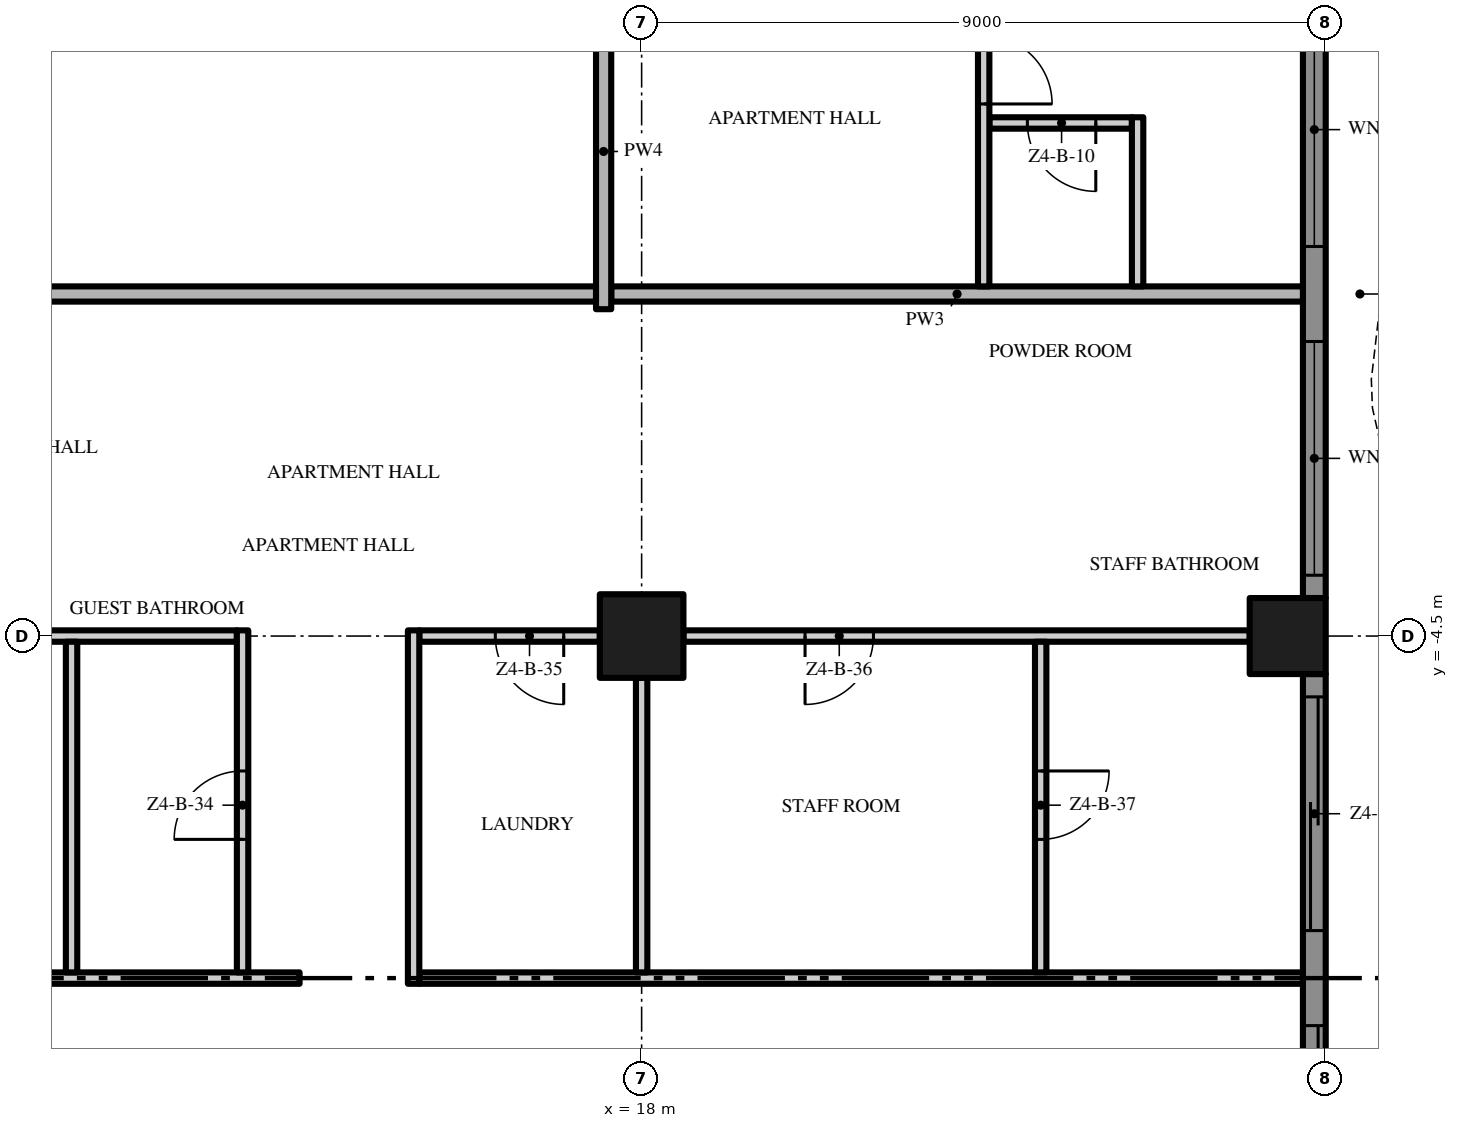
"""IFC4 building model, lengths in metres.
Left out: names, types, materials, properties, quantities, classifications, styles, units other than length and angle.
Written with IfcOpenShell. Run it as: python <this file> out.ifc"""

import sys

from ifc_helpers import new_model, si_unit, direction, frame, frame_2d, origin, origin_2d, place, context, subcontext, project, spatial, polyline, rectangle, outline, extrude, element, fill, save


model = new_model("IFC4")
c1 = context("Model", 3, precision=1e-05, world=origin(), true_north=direction((0.0, 1.0)))
c2 = subcontext(c1, "Body", "Model", "MODEL_VIEW")
j1 = project(units=[si_unit("LENGTHUNIT", "METRE"), si_unit("PLANEANGLEUNIT", "RADIAN")], contexts=[c1])
p1 = place(None, origin())
s1 = spatial("IfcSite", under=j1, at=p1, CompositionType="ELEMENT")
p2 = place(p1, origin())
s2 = spatial("IfcBuilding", under=s1, at=p2, CompositionType="ELEMENT")
p3 = place(p2, frame((0.0, 0.0, 199.6)))
s3 = spatial("IfcBuildingStorey", under=s2, at=p3, CompositionType="ELEMENT", Elevation=199.6)
p4 = place(p3, frame((18.0, -4.5, 0.0), z_axis=(0.0, 0.0, 1.0), x_axis=(1.0, 0.0, 0.0)))
e1 = element("IfcColumn", 1, at=p4, inside=s3, PredefinedType="COLUMN", context=c2, shape_type="SweptSolid", body=[
    extrude(rectangle(XDim=1.1, YDim=1.1, at=origin_2d()), origin(), (0.0, 0.0, 1.0), 3.5),
])
p5 = place(p3, frame((26.5, -4.5, 0.0), z_axis=(0.0, 0.0, 1.0), x_axis=(1.0, 0.0, 0.0)))
e2 = element("IfcColumn", 2, at=p5, inside=s3, PredefinedType="COLUMN", context=c2, shape_type="SweptSolid", body=[
    extrude(rectangle(XDim=1.0, YDim=1.0, at=origin_2d()), origin(), (0.0, 0.0, 1.0), 3.5),
])
p6 = place(p3, frame((26.85, -5.0, 0.0), z_axis=(0.0, 0.0, 1.0), x_axis=(0.0, -1.0, 0.0)))
e3 = element("IfcWall", 3, at=p6, inside=s3, PredefinedType="SOLIDWALL", context=c2, shape_type="SweptSolid", body=[
    extrude(rectangle(XDim=8.0, YDim=0.3, at=frame_2d((4.0, 0.0))), origin(), (0.0, 0.0, 1.0), 3.5),
])
p7 = place(p6, frame((4.625, 0.0, 0.0)))
e4 = element("IfcOpeningElement", 4, at=p7, cuts=e3, PredefinedType="OPENING", context=c2, shape_type="SweptSolid", body=[
    extrude(rectangle(XDim=3.075, YDim=2.4, at=frame_2d((1.538, 1.2))), frame((0.0, 0.16, 0.0), z_axis=(0.0, -1.0, 0.0), x_axis=(1.0, 0.0, 0.0)), (0.0, 0.0, 1.0), 0.32),
])
p8 = place(p6, frame((0.3, 0.0, 0.0)))
e5 = element("IfcOpeningElement", 5, at=p8, cuts=e3, PredefinedType="OPENING", context=c2, shape_type="SweptSolid", body=[
    extrude(rectangle(XDim=3.075, YDim=2.4, at=frame_2d((1.538, 1.2))), frame((0.0, 0.16, 0.0), z_axis=(0.0, -1.0, 0.0), x_axis=(1.0, 0.0, 0.0)), (0.0, 0.0, 1.0), 0.32),
])
p9 = place(p3, frame((26.85, 4.0, 0.0), z_axis=(0.0, 0.0, 1.0), x_axis=(0.0, -1.0, 0.0)))
e6 = element("IfcWall", 6, at=p9, inside=s3, PredefinedType="SOLIDWALL", context=c2, shape_type="SweptSolid", body=[
    extrude(rectangle(XDim=8.0, YDim=0.3, at=frame_2d((4.0, 0.0))), origin(), (0.0, 0.0, 1.0), 3.5),
])
p10 = place(p9, frame((4.625, 0.0, 0.45)))
e7 = element("IfcOpeningElement", 7, at=p10, cuts=e6, PredefinedType="OPENING", context=c2, shape_type="SweptSolid", body=[
    extrude(rectangle(XDim=3.075, YDim=2.65, at=frame_2d((1.538, 1.325))), frame((0.0, 0.16, 0.0), z_axis=(0.0, -1.0, 0.0), x_axis=(1.0, 0.0, 0.0)), (0.0, 0.0, 1.0), 0.32),
])
p11 = place(p9, frame((0.3, 0.0, 0.45)))
e8 = element("IfcOpeningElement", 8, at=p11, cuts=e6, PredefinedType="OPENING", context=c2, shape_type="SweptSolid", body=[
    extrude(rectangle(XDim=3.075, YDim=2.65, at=frame_2d((1.538, 1.325))), frame((0.0, 0.16, 0.0), z_axis=(0.0, -1.0, 0.0), x_axis=(1.0, 0.0, 0.0)), (0.0, 0.0, 1.0), 0.32),
])
p12 = place(p3, origin())
e9 = element("IfcWall", 9, at=p12, inside=s3, PredefinedType="USERDEFINED", context=c2, shape_type="SweptSolid", body=[
    extrude(outline(polyline([(27.951, -18.0), (27.615, -16.5), (27.6, -16.125), (27.731, -15.0), (28.255, -13.5), (28.988, -12.0), (29.649, -10.5), (29.985, -9.0), (30.0, -8.625), (29.869, -7.5), (29.345, -6.0), (28.612, -4.5), (27.951, -3.0), (27.615, -1.5), (27.6, -1.125), (27.731, 0.0), (28.255, 1.5), (28.988, 3.0), (29.649, 4.5), (29.985, 6.0), (30.0, 6.375), (29.869, 7.5), (29.345, 9.0), (28.612, 10.5), (27.951, 12.0), (27.615, 13.5), (27.6, 13.875), (27.731, 15.0), (28.255, 16.5), (28.988, 18.0), (28.763, 18.11), (28.024, 16.596), (27.486, 15.056), (27.349, 13.885), (27.366, 13.467), (27.713, 11.921), (28.385, 10.395), (29.114, 8.904), (29.624, 7.444), (29.749, 6.365), (29.736, 6.033), (29.41, 4.579), (28.761, 3.105), (28.024, 1.596), (27.486, 0.056), (27.349, -1.115), (27.366, -1.533), (27.713, -3.079), (28.385, -4.605), (29.114, -6.096), (29.624, -7.556), (29.749, -8.635), (29.736, -8.967), (29.41, -10.421), (28.761, -11.895), (28.024, -13.404), (27.486, -14.944), (27.349, -16.115), (27.366, -16.533), (27.708, -18.055), (27.951, -18.0)])), origin(), (0.0, 0.0, 1.0), 0.9),
])
p13 = place(p3, frame((0.1, -9.0, 0.0), z_axis=(0.0, 0.0, 1.0), x_axis=(1.0, 0.0, 0.0)))
e10 = element("IfcWall", 10, at=p13, inside=s3, PredefinedType="PARTITIONING", context=c2, shape_type="SweptSolid", body=[
    extrude(rectangle(XDim=13.4, YDim=0.15, at=frame_2d((6.7, 0.0))), origin(), (0.0, 0.0, 1.0), 3.5),
])
p14 = place(p13, frame((6.9, 0.0, 0.0)))
e11 = element("IfcOpeningElement", 11, at=p14, cuts=e10, PredefinedType="OPENING", context=c2, shape_type="SweptSolid", body=[
    extrude(rectangle(XDim=1.0, YDim=2.4, at=frame_2d((0.5, 1.2))), frame((0.0, 0.085, 0.0), z_axis=(0.0, -1.0, 0.0), x_axis=(1.0, 0.0, 0.0)), (0.0, 0.0, 1.0), 0.17),
])
p15 = place(p3, frame((15.075, -9.0, 0.0), z_axis=(0.0, 0.0, 1.0), x_axis=(1.0, 0.0, 0.0)))
e12 = element("IfcWall", 12, at=p15, inside=s3, PredefinedType="PARTITIONING", context=c2, shape_type="SweptSolid", body=[
    extrude(rectangle(XDim=11.625, YDim=0.15, at=frame_2d((5.812, 0.0))), origin(), (0.0, 0.0, 1.0), 3.5),
])
p16 = place(p3, frame((9.55, -4.5, 0.0), z_axis=(0.0, 0.0, 1.0), x_axis=(1.0, 0.0, 0.0)))
e13 = element("IfcWall", 13, at=p16, inside=s3, PredefinedType="PARTITIONING", context=c2, shape_type="SweptSolid", body=[
    extrude(rectangle(XDim=3.125, YDim=0.15, at=frame_2d((1.562, 0.0))), origin(), (0.0, 0.0, 1.0), 3.5),
])
p17 = place(p3, frame((17.45, -4.5, 0.0), z_axis=(0.0, 0.0, 1.0), x_axis=(-1.0, 0.0, 0.0)))
e14 = element("IfcWall", 14, at=p17, inside=s3, PredefinedType="PARTITIONING", context=c2, shape_type="SweptSolid", body=[
    extrude(rectangle(XDim=2.375, YDim=0.15, at=frame_2d((1.188, 0.0))), origin(), (0.0, 0.0, 1.0), 3.5),
])
p18 = place(p17, frame((0.475, 0.0, 0.0)))
e15 = element("IfcOpeningElement", 15, at=p18, cuts=e14, PredefinedType="OPENING", context=c2, shape_type="SweptSolid", body=[
    extrude(rectangle(XDim=0.9, YDim=2.1, at=frame_2d((0.45, 1.05))), frame((0.0, 0.085, 0.0), z_axis=(0.0, -1.0, 0.0), x_axis=(1.0, 0.0, 0.0)), (0.0, 0.0, 1.0), 0.17),
])
p19 = place(p3, frame((26.0, -4.5, 0.0), z_axis=(0.0, 0.0, 1.0), x_axis=(-1.0, 0.0, 0.0)))
e16 = element("IfcWall", 16, at=p19, inside=s3, PredefinedType="PARTITIONING", context=c2, shape_type="SweptSolid", body=[
    extrude(rectangle(XDim=7.45, YDim=0.15, at=frame_2d((3.725, 0.0))), origin(), (0.0, 0.0, 1.0), 3.5),
])
p20 = place(p19, frame((4.95, 0.0, 0.0)))
e17 = element("IfcOpeningElement", 17, at=p20, cuts=e16, PredefinedType="OPENING", context=c2, shape_type="SweptSolid", body=[
    extrude(rectangle(XDim=0.9, YDim=2.1, at=frame_2d((0.45, 1.05))), frame((0.0, 0.085, 0.0), z_axis=(0.0, -1.0, 0.0), x_axis=(1.0, 0.0, 0.0)), (0.0, 0.0, 1.0), 0.17),
])
p21 = place(p3, frame((17.4, 0.0, 0.0), z_axis=(0.0, 0.0, 1.0), x_axis=(-1.0, 0.0, 0.0)))
e18 = element("IfcWall", 18, at=p21, inside=s3, PredefinedType="PARTITIONING", context=c2, shape_type="SweptSolid", body=[
    extrude(rectangle(XDim=17.3, YDim=0.2, at=frame_2d((8.65, 0.0))), origin(), (0.0, 0.0, 1.0), 3.5),
])
p22 = place(p21, frame((7.65, 0.0, 0.0)))
e19 = element("IfcOpeningElement", 19, at=p22, cuts=e18, PredefinedType="OPENING", context=c2, shape_type="SweptSolid", body=[
    extrude(rectangle(XDim=1.5, YDim=2.4, at=frame_2d((0.75, 1.2))), frame((0.0, 0.11, 0.0), z_axis=(0.0, -1.0, 0.0), x_axis=(1.0, 0.0, 0.0)), (0.0, 0.0, 1.0), 0.22),
])
p23 = place(p3, frame((17.6, 0.0, 0.0), z_axis=(0.0, 0.0, 1.0), x_axis=(1.0, 0.0, 0.0)))
e20 = element("IfcWall", 20, at=p23, inside=s3, PredefinedType="PARTITIONING", context=c2, shape_type="SweptSolid", body=[
    extrude(rectangle(XDim=9.1, YDim=0.2, at=frame_2d((4.55, 0.0))), origin(), (0.0, 0.0, 1.0), 3.5),
])
p24 = place(p3, frame((24.45, 2.25, 0.0), z_axis=(0.0, 0.0, 1.0), x_axis=(-1.0, 0.0, 0.0)))
e21 = element("IfcWall", 21, at=p24, inside=s3, PredefinedType="PARTITIONING", context=c2, shape_type="SweptSolid", body=[
    extrude(rectangle(XDim=1.875, YDim=0.15, at=frame_2d((0.938, 0.0))), origin(), (0.0, 0.0, 1.0), 3.5),
])
p25 = place(p24, frame((0.475, 0.0, 0.0)))
e22 = element("IfcOpeningElement", 22, at=p25, cuts=e21, PredefinedType="OPENING", context=c2, shape_type="SweptSolid", body=[
    extrude(rectangle(XDim=0.9, YDim=2.1, at=frame_2d((0.45, 1.05))), frame((0.0, 0.085, 0.0), z_axis=(0.0, -1.0, 0.0), x_axis=(1.0, 0.0, 0.0)), (0.0, 0.0, 1.0), 0.17),
])
p26 = place(p3, frame((10.5, -8.925, 0.0), z_axis=(0.0, 0.0, 1.0), x_axis=(0.0, 1.0, 0.0)))
e23 = element("IfcWall", 23, at=p26, inside=s3, PredefinedType="PARTITIONING", context=c2, shape_type="SweptSolid", body=[
    extrude(rectangle(XDim=4.35, YDim=0.15, at=frame_2d((2.175, 0.0))), origin(), (0.0, 0.0, 1.0), 3.5),
])
p27 = place(p3, frame((12.75, -8.925, 0.0), z_axis=(0.0, 0.0, 1.0), x_axis=(0.0, 1.0, 0.0)))
e24 = element("IfcWall", 24, at=p27, inside=s3, PredefinedType="PARTITIONING", context=c2, shape_type="SweptSolid", body=[
    extrude(rectangle(XDim=4.5, YDim=0.15, at=frame_2d((2.25, 0.0))), origin(), (0.0, 0.0, 1.0), 3.5),
])
p28 = place(p27, frame((1.75, 0.0, 0.0)))
e25 = element("IfcOpeningElement", 25, at=p28, cuts=e24, PredefinedType="OPENING", context=c2, shape_type="SweptSolid", body=[
    extrude(rectangle(XDim=0.9, YDim=2.1, at=frame_2d((0.45, 1.05))), frame((0.0, 0.085, 0.0), z_axis=(0.0, -1.0, 0.0), x_axis=(1.0, 0.0, 0.0)), (0.0, 0.0, 1.0), 0.17),
])
p29 = place(p3, frame((15.0, -9.075, 0.0), z_axis=(0.0, 0.0, 1.0), x_axis=(0.0, 1.0, 0.0)))
e26 = element("IfcWall", 26, at=p29, inside=s3, PredefinedType="PARTITIONING", context=c2, shape_type="SweptSolid", body=[
    extrude(rectangle(XDim=4.65, YDim=0.15, at=frame_2d((2.325, 0.0))), origin(), (0.0, 0.0, 1.0), 3.5),
])
p30 = place(p3, frame((17.5, -0.2, 0.0), z_axis=(0.0, 0.0, 1.0), x_axis=(0.0, 1.0, 0.0)))
e27 = element("IfcWall", 27, at=p30, inside=s3, PredefinedType="PARTITIONING", context=c2, shape_type="SweptSolid", body=[
    extrude(rectangle(XDim=4.15, YDim=0.2, at=frame_2d((2.075, 0.0))), origin(), (0.0, 0.0, 1.0), 3.5),
])
p31 = place(p3, frame((18.0, -8.925, 0.0), z_axis=(0.0, 0.0, 1.0), x_axis=(0.0, 1.0, 0.0)))
e28 = element("IfcWall", 28, at=p31, inside=s3, PredefinedType="PARTITIONING", context=c2, shape_type="SweptSolid", body=[
    extrude(rectangle(XDim=3.875, YDim=0.15, at=frame_2d((1.938, 0.0))), origin(), (0.0, 0.0, 1.0), 3.5),
])
p32 = place(p3, frame((22.5, 17.5, 0.0), z_axis=(0.0, 0.0, 1.0), x_axis=(0.0, -1.0, 0.0)))
e29 = element("IfcWall", 29, at=p32, inside=s3, PredefinedType="PARTITIONING", context=c2, shape_type="SweptSolid", body=[
    extrude(rectangle(XDim=17.4, YDim=0.15, at=frame_2d((8.7, 0.0))), origin(), (0.0, 0.0, 1.0), 3.5),
])
p33 = place(p32, frame((13.2, 0.0, 0.0)))
e30 = element("IfcOpeningElement", 30, at=p33, cuts=e29, PredefinedType="OPENING", context=c2, shape_type="SweptSolid", body=[
    extrude(rectangle(XDim=1.8, YDim=2.4, at=frame_2d((0.9, 1.2))), frame((0.0, 0.085, 0.0), z_axis=(0.0, -1.0, 0.0), x_axis=(1.0, 0.0, 0.0)), (0.0, 0.0, 1.0), 0.17),
])
p34 = place(p32, frame((5.75, 0.0, 0.0)))
e31 = element("IfcOpeningElement", 31, at=p34, cuts=e29, PredefinedType="OPENING", context=c2, shape_type="SweptSolid", body=[
    extrude(rectangle(XDim=1.0, YDim=2.4, at=frame_2d((0.5, 1.2))), frame((0.0, 0.085, 0.0), z_axis=(0.0, -1.0, 0.0), x_axis=(1.0, 0.0, 0.0)), (0.0, 0.0, 1.0), 0.17),
])
p35 = place(p3, frame((23.25, -4.575, 0.0), z_axis=(0.0, 0.0, 1.0), x_axis=(0.0, -1.0, 0.0)))
e32 = element("IfcWall", 32, at=p35, inside=s3, PredefinedType="PARTITIONING", context=c2, shape_type="SweptSolid", body=[
    extrude(rectangle(XDim=4.35, YDim=0.15, at=frame_2d((2.175, 0.0))), origin(), (0.0, 0.0, 1.0), 3.5),
])
p36 = place(p35, frame((1.7, 0.0, 0.0)))
e33 = element("IfcOpeningElement", 33, at=p36, cuts=e32, PredefinedType="OPENING", context=c2, shape_type="SweptSolid", body=[
    extrude(rectangle(XDim=0.9, YDim=2.1, at=frame_2d((0.45, 1.05))), frame((0.0, 0.085, 0.0), z_axis=(0.0, -1.0, 0.0), x_axis=(1.0, 0.0, 0.0)), (0.0, 0.0, 1.0), 0.17),
])
p37 = place(p3, frame((24.525, 0.1, 0.0), z_axis=(0.0, 0.0, 1.0), x_axis=(0.0, 1.0, 0.0)))
e34 = element("IfcWall", 34, at=p37, inside=s3, PredefinedType="PARTITIONING", context=c2, shape_type="SweptSolid", body=[
    extrude(rectangle(XDim=2.225, YDim=0.15, at=frame_2d((1.113, 0.0))), origin(), (0.0, 0.0, 1.0), 3.5),
])
p38 = place(p7, origin())
e35 = element("IfcDoor", 35, at=p38, inside=s3, OperationType="SINGLE_SWING_LEFT", PredefinedType="DOOR", context=c2, shape_type="SweptSolid", body=[
    extrude(rectangle(XDim=3.075, YDim=2.4, at=frame_2d((1.538, 1.2))), frame((0.0, 0.025, 0.0), z_axis=(0.0, -1.0, 0.0), x_axis=(1.0, 0.0, 0.0)), (0.0, 0.0, 1.0), 0.05),
])
fill(e4, e35)
p39 = place(p8, origin())
e36 = element("IfcDoor", 36, at=p39, inside=s3, OperationType="SINGLE_SWING_LEFT", PredefinedType="DOOR", context=c2, shape_type="SweptSolid", body=[
    extrude(rectangle(XDim=3.075, YDim=2.4, at=frame_2d((1.538, 1.2))), frame((0.0, 0.025, 0.0), z_axis=(0.0, -1.0, 0.0), x_axis=(1.0, 0.0, 0.0)), (0.0, 0.0, 1.0), 0.05),
])
fill(e5, e36)
p40 = place(p10, origin())
e37 = element("IfcWindow", 37, at=p40, inside=s3, PartitioningType="SINGLE_PANEL", PredefinedType="WINDOW", context=c2, shape_type="SweptSolid", body=[
    extrude(rectangle(XDim=3.075, YDim=2.65, at=frame_2d((1.538, 1.325))), frame((0.0, 0.03, 0.0), z_axis=(0.0, -1.0, 0.0), x_axis=(1.0, 0.0, 0.0)), (0.0, 0.0, 1.0), 0.06),
])
fill(e7, e37)
p41 = place(p11, origin())
e38 = element("IfcWindow", 38, at=p41, inside=s3, PartitioningType="SINGLE_PANEL", PredefinedType="WINDOW", context=c2, shape_type="SweptSolid", body=[
    extrude(rectangle(XDim=3.075, YDim=2.65, at=frame_2d((1.538, 1.325))), frame((0.0, 0.03, 0.0), z_axis=(0.0, -1.0, 0.0), x_axis=(1.0, 0.0, 0.0)), (0.0, 0.0, 1.0), 0.06),
])
fill(e8, e38)
p42 = place(p33, origin())
e39 = element("IfcDoor", 39, at=p42, inside=s3, OperationType="DOUBLE_DOOR_SINGLE_SWING", PredefinedType="DOOR", context=c2, shape_type="SweptSolid", body=[
    extrude(rectangle(XDim=1.8, YDim=2.4, at=frame_2d((0.9, 1.2))), frame((0.0, 0.025, 0.0), z_axis=(0.0, -1.0, 0.0), x_axis=(1.0, 0.0, 0.0)), (0.0, 0.0, 1.0), 0.05),
])
fill(e30, e39)
p43 = place(p25, origin())
e40 = element("IfcDoor", 40, at=p43, inside=s3, OperationType="SINGLE_SWING_LEFT", PredefinedType="DOOR", context=c2, shape_type="SweptSolid", body=[
    extrude(rectangle(XDim=0.9, YDim=2.1, at=frame_2d((0.45, 1.05))), frame((0.0, 0.025, 0.0), z_axis=(0.0, -1.0, 0.0), x_axis=(1.0, 0.0, 0.0)), (0.0, 0.0, 1.0), 0.05),
])
fill(e22, e40)
p44 = place(p28, origin())
e41 = element("IfcDoor", 41, at=p44, inside=s3, OperationType="SINGLE_SWING_LEFT", PredefinedType="DOOR", context=c2, shape_type="SweptSolid", body=[
    extrude(rectangle(XDim=0.9, YDim=2.1, at=frame_2d((0.45, 1.05))), frame((0.0, 0.025, 0.0), z_axis=(0.0, -1.0, 0.0), x_axis=(1.0, 0.0, 0.0)), (0.0, 0.0, 1.0), 0.05),
])
fill(e25, e41)
p45 = place(p18, origin())
e42 = element("IfcDoor", 42, at=p45, inside=s3, OperationType="SINGLE_SWING_LEFT", PredefinedType="DOOR", context=c2, shape_type="SweptSolid", body=[
    extrude(rectangle(XDim=0.9, YDim=2.1, at=frame_2d((0.45, 1.05))), frame((0.0, 0.025, 0.0), z_axis=(0.0, -1.0, 0.0), x_axis=(1.0, 0.0, 0.0)), (0.0, 0.0, 1.0), 0.05),
])
fill(e15, e42)
p46 = place(p20, origin())
e43 = element("IfcDoor", 43, at=p46, inside=s3, OperationType="SINGLE_SWING_RIGHT", PredefinedType="DOOR", context=c2, shape_type="SweptSolid", body=[
    extrude(rectangle(XDim=0.9, YDim=2.1, at=frame_2d((0.45, 1.05))), frame((0.0, 0.025, 0.0), z_axis=(0.0, -1.0, 0.0), x_axis=(1.0, 0.0, 0.0)), (0.0, 0.0, 1.0), 0.05),
])
fill(e17, e43)
p47 = place(p36, origin())
e44 = element("IfcDoor", 44, at=p47, inside=s3, OperationType="SINGLE_SWING_LEFT", PredefinedType="DOOR", context=c2, shape_type="SweptSolid", body=[
    extrude(rectangle(XDim=0.9, YDim=2.1, at=frame_2d((0.45, 1.05))), frame((0.0, 0.025, 0.0), z_axis=(0.0, -1.0, 0.0), x_axis=(1.0, 0.0, 0.0)), (0.0, 0.0, 1.0), 0.05),
])
fill(e33, e44)
save(model, sys.argv[1])
